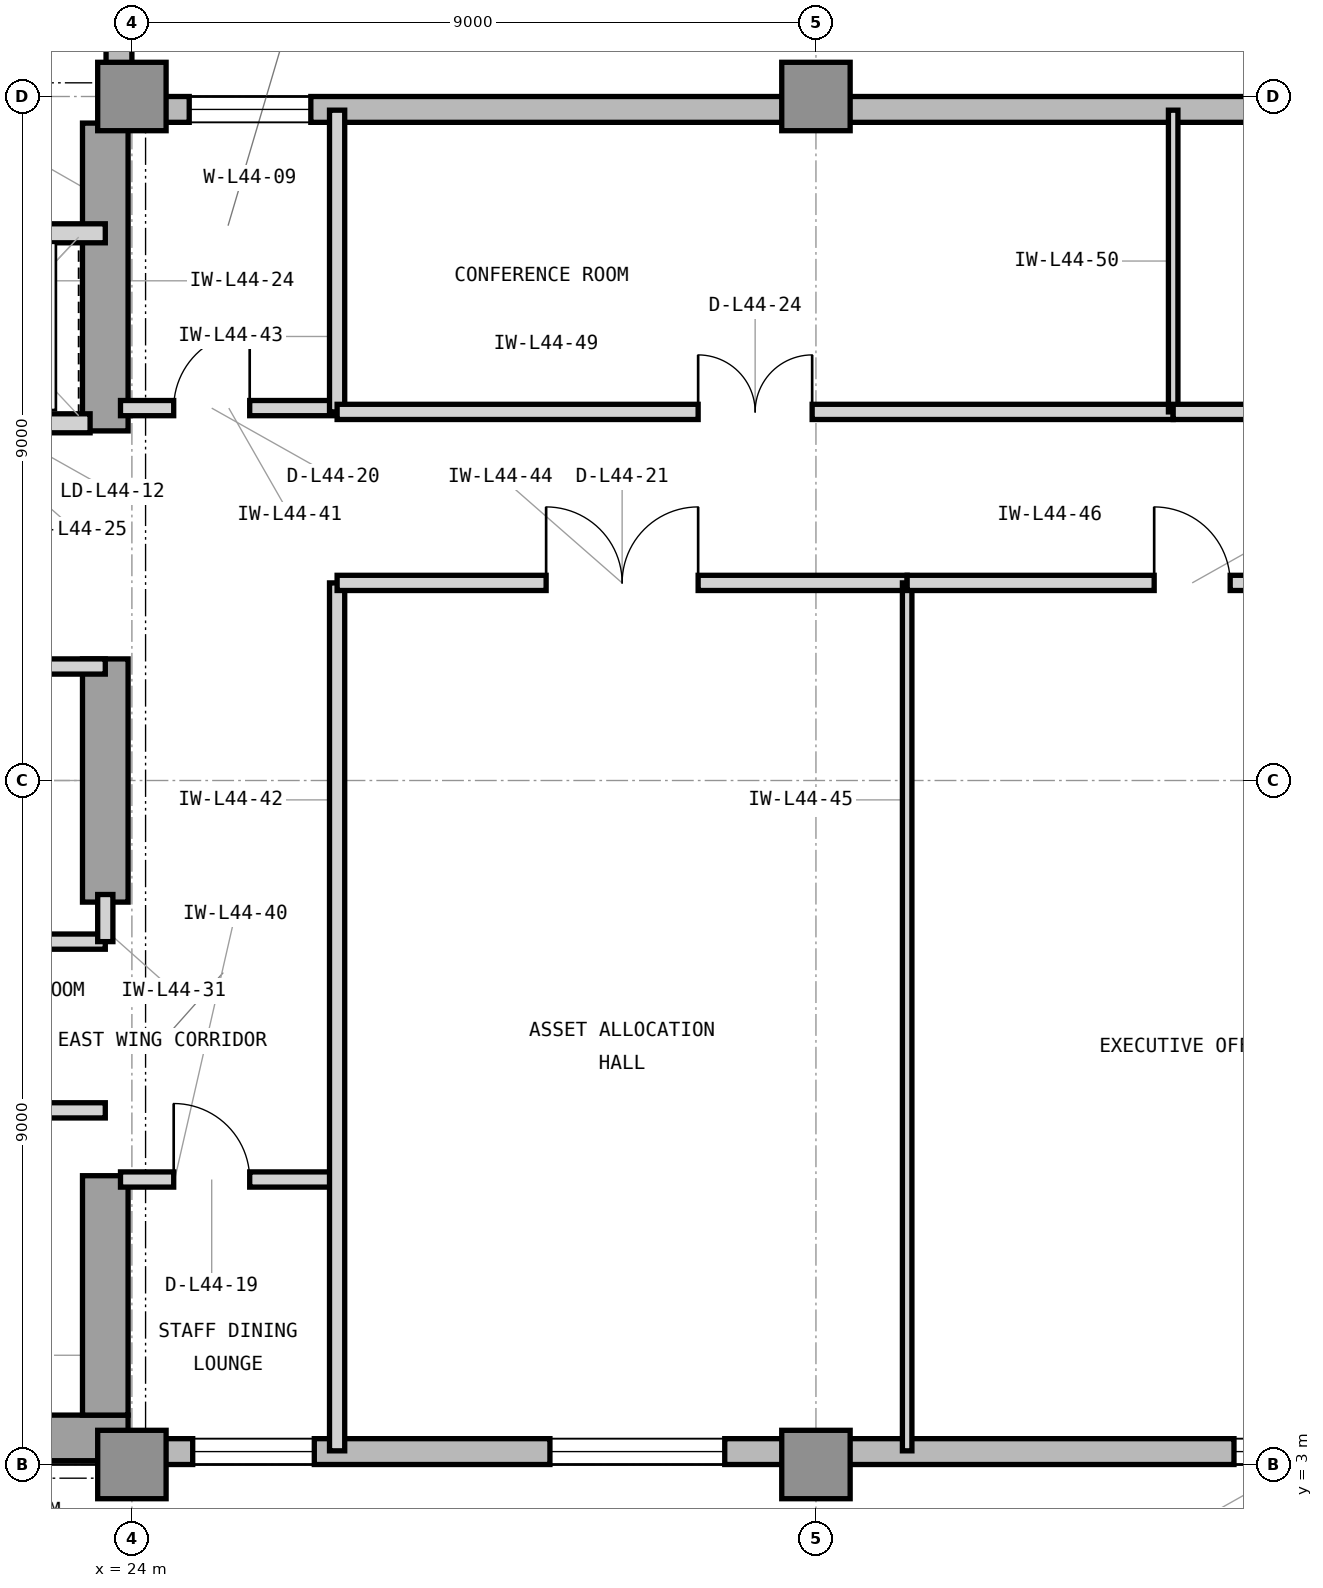
"""IFC4 building model, lengths in metres.
Left out: names, types, materials, properties, quantities, classifications, styles, units other than length and angle.
Written with IfcOpenShell. Run it as: python <this file> out.ifc"""

import sys

from ifc_helpers import new_model, si_unit, direction, frame, frame_2d, origin, origin_2d, place, context, subcontext, project, spatial, rectangle, extrude, element, fill, save


model = new_model("IFC4")
c1 = context("Model", 3, precision=1e-05, world=origin(), true_north=direction((0.0, 1.0)))
c2 = subcontext(c1, "Body", "Model", "MODEL_VIEW")
j1 = project(units=[si_unit("LENGTHUNIT", "METRE"), si_unit("PLANEANGLEUNIT", "RADIAN")], contexts=[c1])
p1 = place(None, origin())
s1 = spatial("IfcSite", under=j1, at=p1, CompositionType="ELEMENT")
p2 = place(p1, origin())
s2 = spatial("IfcBuilding", under=s1, at=p2, CompositionType="ELEMENT")
p3 = place(p2, frame((0.0, 0.0, 183.9)))
s3 = spatial("IfcBuildingStorey", under=s2, at=p3, CompositionType="ELEMENT", Elevation=183.9)
p4 = place(p3, frame((7.475, 3.35, 0.0), z_axis=(0.0, 0.0, 1.0), x_axis=(1.0, 0.0, 0.0)))
e1 = element("IfcWall", 1, at=p4, inside=s3, PredefinedType="SHEAR", context=c2, shape_type="SweptSolid", body=[
    extrude(rectangle(XDim=16.475, YDim=0.6, at=frame_2d((8.237, 0.0))), origin(), (0.0, 0.0, 1.0), 3.9),
])
p5 = place(p3, frame((23.65, 3.65, 0.0), z_axis=(0.0, 0.0, 1.0), x_axis=(0.0, 1.0, 0.0)))
e2 = element("IfcWall", 2, at=p5, inside=s3, PredefinedType="SHEAR", context=c2, shape_type="SweptSolid", body=[
    extrude(rectangle(XDim=3.15, YDim=0.6, at=frame_2d((1.575, 0.0))), origin(), (0.0, 0.0, 1.0), 3.9),
])
p6 = place(p3, frame((23.65, 10.4, 0.0), z_axis=(0.0, 0.0, 1.0), x_axis=(0.0, 1.0, 0.0)))
e3 = element("IfcWall", 3, at=p6, inside=s3, PredefinedType="SHEAR", context=c2, shape_type="SweptSolid", body=[
    extrude(rectangle(XDim=3.2, YDim=0.6, at=frame_2d((1.6, 0.0))), origin(), (0.0, 0.0, 1.0), 3.9),
])
p7 = place(p3, frame((23.65, 16.6, 0.0), z_axis=(0.0, 0.0, 1.0), x_axis=(0.0, 1.0, 0.0)))
e4 = element("IfcWall", 4, at=p7, inside=s3, PredefinedType="SHEAR", context=c2, shape_type="SweptSolid", body=[
    extrude(rectangle(XDim=4.05, YDim=0.6, at=frame_2d((2.025, 0.0))), origin(), (0.0, 0.0, 1.0), 3.9),
])
for number, where, z_axis, x_axis in (
    (5, (24.0, 3.0, 0.0), (0.0, 0.0, 1.0), (1.0, 0.0, 0.0)),
    (6, (24.0, 21.0, 0.0), (0.0, 0.0, 1.0), (1.0, 0.0, 0.0)),
    (7, (33.0, 3.0, 0.0), (0.0, 0.0, 1.0), (1.0, 0.0, 0.0)),
    (8, (33.0, 21.0, 0.0), (0.0, 0.0, 1.0), (1.0, 0.0, 0.0)),
):
    element("IfcColumn", number, at=place(p3, frame(where, z_axis=z_axis, x_axis=x_axis)), inside=s3, PredefinedType="COLUMN", context=c2, shape_type="SweptSolid", body=[
        extrude(rectangle(XDim=0.9, YDim=0.9, at=origin_2d()), origin(), (0.0, 0.0, 1.0), 3.9),
    ])
p8 = place(p3, frame((23.9, 3.17, 0.0), z_axis=(0.0, 0.0, 1.0), x_axis=(1.0, 0.0, 0.0)))
e9 = element("IfcWall", 9, at=p8, inside=s3, PredefinedType="STANDARD", context=c2, shape_type="SweptSolid", body=[
    extrude(rectangle(XDim=31.5, YDim=0.34, at=frame_2d((15.75, 0.0))), origin(), (0.0, 0.0, 1.0), 3.7),
])
p9 = place(p8, frame((5.6, 0.0, 0.9)))
e10 = element("IfcOpeningElement", 10, at=p9, cuts=e9, PredefinedType="OPENING", context=c2, shape_type="SweptSolid", body=[
    extrude(rectangle(XDim=2.3, YDim=2.2, at=frame_2d((1.15, 1.1))), frame((0.0, 0.18, 0.0), z_axis=(0.0, -1.0, 0.0), x_axis=(1.0, 0.0, 0.0)), (0.0, 0.0, 1.0), 0.36),
])
p10 = place(p8, frame((14.6, 0.0, 0.9)))
e11 = element("IfcOpeningElement", 11, at=p10, cuts=e9, PredefinedType="OPENING", context=c2, shape_type="SweptSolid", body=[
    extrude(rectangle(XDim=2.3, YDim=2.2, at=frame_2d((1.15, 1.1))), frame((0.0, 0.18, 0.0), z_axis=(0.0, -1.0, 0.0), x_axis=(1.0, 0.0, 0.0)), (0.0, 0.0, 1.0), 0.36),
])
p11 = place(p8, frame((19.1, 0.0, 0.9)))
e12 = element("IfcOpeningElement", 12, at=p11, cuts=e9, PredefinedType="OPENING", context=c2, shape_type="SweptSolid", body=[
    extrude(rectangle(XDim=2.3, YDim=2.2, at=frame_2d((1.15, 1.1))), frame((0.0, 0.18, 0.0), z_axis=(0.0, -1.0, 0.0), x_axis=(1.0, 0.0, 0.0)), (0.0, 0.0, 1.0), 0.36),
])
p12 = place(p8, frame((0.9, 0.0, 0.9)))
e13 = element("IfcOpeningElement", 13, at=p12, cuts=e9, PredefinedType="OPENING", context=c2, shape_type="SweptSolid", body=[
    extrude(rectangle(XDim=1.6, YDim=2.2, at=frame_2d((0.8, 1.1))), frame((0.0, 0.18, 0.0), z_axis=(0.0, -1.0, 0.0), x_axis=(1.0, 0.0, 0.0)), (0.0, 0.0, 1.0), 0.36),
])
p13 = place(p3, frame((55.4, 20.83, 0.0), z_axis=(0.0, 0.0, 1.0), x_axis=(-1.0, 0.0, 0.0)))
e14 = element("IfcWall", 14, at=p13, inside=s3, PredefinedType="STANDARD", context=c2, shape_type="SweptSolid", body=[
    extrude(rectangle(XDim=31.4, YDim=0.34, at=frame_2d((15.7, 0.0))), origin(), (0.0, 0.0, 1.0), 3.7),
])
p14 = place(p13, frame((29.046, 0.0, 0.9)))
e15 = element("IfcOpeningElement", 15, at=p14, cuts=e14, PredefinedType="OPENING", context=c2, shape_type="SweptSolid", body=[
    extrude(rectangle(XDim=1.6, YDim=2.2, at=frame_2d((0.8, 1.1))), frame((0.0, 0.18, 0.0), z_axis=(0.0, -1.0, 0.0), x_axis=(1.0, 0.0, 0.0)), (0.0, 0.0, 1.0), 0.36),
])
p15 = place(p13, frame((10.125, 0.0, 0.9)))
e16 = element("IfcOpeningElement", 16, at=p15, cuts=e14, PredefinedType="OPENING", context=c2, shape_type="SweptSolid", body=[
    extrude(rectangle(XDim=2.3, YDim=2.2, at=frame_2d((1.15, 1.1))), frame((0.0, 0.18, 0.0), z_axis=(0.0, -1.0, 0.0), x_axis=(1.0, 0.0, 0.0)), (0.0, 0.0, 1.0), 0.36),
])
p16 = place(p3, frame((23.83, 21.0, 0.0), z_axis=(0.0, 0.0, 1.0), x_axis=(0.0, 1.0, 0.0)))
e17 = element("IfcWall", 17, at=p16, inside=s3, PredefinedType="STANDARD", context=c2, shape_type="SweptSolid", body=[
    extrude(rectangle(XDim=22.4, YDim=0.34, at=frame_2d((11.2, 0.0))), origin(), (0.0, 0.0, 1.0), 3.7),
])
p17 = place(p16, frame((10.955, 0.0, 0.9)))
e18 = element("IfcOpeningElement", 18, at=p17, cuts=e17, PredefinedType="OPENING", context=c2, shape_type="SweptSolid", body=[
    extrude(rectangle(XDim=2.3, YDim=2.2, at=frame_2d((1.15, 1.1))), frame((0.0, 0.18, 0.0), z_axis=(0.0, -1.0, 0.0), x_axis=(1.0, 0.0, 0.0)), (0.0, 0.0, 1.0), 0.36),
])
p18 = place(p3, frame((21.05, 16.7, 0.0), z_axis=(0.0, 0.0, 1.0), x_axis=(1.0, 0.0, 0.0)))
e19 = element("IfcWall", 19, at=p18, inside=s3, PredefinedType="PARTITIONING", context=c2, shape_type="SweptSolid", body=[
    extrude(rectangle(XDim=2.4, YDim=0.25, at=frame_2d((1.2, 0.0))), origin(), (0.0, 0.0, 1.0), 3.283),
])
p19 = place(p18, frame((0.52, 0.0, 0.0)))
e20 = element("IfcOpeningElement", 20, at=p19, cuts=e19, PredefinedType="OPENING", context=c2, shape_type="SweptSolid", body=[
    extrude(rectangle(XDim=1.15, YDim=2.25, at=frame_2d((0.575, 1.125))), frame((0.0, 0.135, 0.0), z_axis=(0.0, -1.0, 0.0), x_axis=(1.0, 0.0, 0.0)), (0.0, 0.0, 1.0), 0.27),
])
p20 = place(p3, frame((16.45, 19.2, 0.0), z_axis=(0.0, 0.0, 1.0), x_axis=(1.0, 0.0, 0.0)))
e21 = element("IfcWall", 21, at=p20, inside=s3, PredefinedType="PARTITIONING", context=c2, shape_type="SweptSolid", body=[
    extrude(rectangle(XDim=7.2, YDim=0.25, at=frame_2d((3.6, 0.0))), origin(), (0.0, 0.0, 1.0), 3.69),
])
p21 = place(p3, frame((20.85, 7.66, 0.0), z_axis=(0.0, 0.0, 1.0), x_axis=(1.0, 0.0, 0.0)))
e22 = element("IfcWall", 22, at=p21, inside=s3, PredefinedType="PARTITIONING", context=c2, shape_type="SweptSolid", body=[
    extrude(rectangle(XDim=2.8, YDim=0.2, at=frame_2d((1.4, 0.0))), origin(), (0.0, 0.0, 1.0), 3.69),
])
p22 = place(p21, frame((0.95, 0.0, 0.0)))
e23 = element("IfcOpeningElement", 23, at=p22, cuts=e22, PredefinedType="OPENING", context=c2, shape_type="SweptSolid", body=[
    extrude(rectangle(XDim=0.9, YDim=2.1, at=frame_2d((0.45, 1.05))), frame((0.0, 0.11, 0.0), z_axis=(0.0, -1.0, 0.0), x_axis=(1.0, 0.0, 0.0)), (0.0, 0.0, 1.0), 0.22),
])
p23 = place(p3, frame((14.825, 9.88, 0.0), z_axis=(0.0, 0.0, 1.0), x_axis=(1.0, 0.0, 0.0)))
e24 = element("IfcWall", 24, at=p23, inside=s3, PredefinedType="PARTITIONING", context=c2, shape_type="SweptSolid", body=[
    extrude(rectangle(XDim=8.825, YDim=0.2, at=frame_2d((4.413, 0.0))), origin(), (0.0, 0.0, 1.0), 3.69),
])
p24 = place(p3, frame((23.65, 9.88, 0.0), z_axis=(0.0, 0.0, 1.0), x_axis=(0.0, 1.0, 0.0)))
e25 = element("IfcWall", 25, at=p24, inside=s3, PredefinedType="PARTITIONING", context=c2, shape_type="SweptSolid", body=[
    extrude(rectangle(XDim=0.62, YDim=0.2, at=frame_2d((0.31, 0.0))), origin(), (0.0, 0.0, 1.0), 3.69),
])
p25 = place(p3, frame((19.9, 13.5, 0.0), z_axis=(0.0, 0.0, 1.0), x_axis=(1.0, 0.0, 0.0)))
e26 = element("IfcWall", 26, at=p25, inside=s3, PredefinedType="PARTITIONING", context=c2, shape_type="SweptSolid", body=[
    extrude(rectangle(XDim=3.75, YDim=0.2, at=frame_2d((1.875, 0.0))), origin(), (0.0, 0.0, 1.0), 3.283),
])
p26 = place(p25, frame((1.4, 0.0, 0.0)))
e27 = element("IfcOpeningElement", 27, at=p26, cuts=e26, PredefinedType="OPENING", context=c2, shape_type="SweptSolid", body=[
    extrude(rectangle(XDim=0.95, YDim=2.1, at=frame_2d((0.475, 1.05))), frame((0.0, 0.11, 0.0), z_axis=(0.0, -1.0, 0.0), x_axis=(1.0, 0.0, 0.0)), (0.0, 0.0, 1.0), 0.22),
])
p27 = place(p3, frame((23.85, 6.75, 0.0), z_axis=(0.0, 0.0, 1.0), x_axis=(1.0, 0.0, 0.0)))
e28 = element("IfcWall", 28, at=p27, inside=s3, PredefinedType="PARTITIONING", context=c2, shape_type="SweptSolid", body=[
    extrude(rectangle(XDim=2.85, YDim=0.2, at=frame_2d((1.425, 0.0))), origin(), (0.0, 0.0, 1.0), 3.69),
])
p28 = place(p27, frame((0.7, 0.0, 0.0)))
e29 = element("IfcOpeningElement", 29, at=p28, cuts=e28, PredefinedType="OPENING", context=c2, shape_type="SweptSolid", body=[
    extrude(rectangle(XDim=1.0, YDim=2.15, at=frame_2d((0.5, 1.075))), frame((0.0, 0.11, 0.0), z_axis=(0.0, -1.0, 0.0), x_axis=(1.0, 0.0, 0.0)), (0.0, 0.0, 1.0), 0.22),
])
p29 = place(p3, frame((23.85, 16.9, 0.0), z_axis=(0.0, 0.0, 1.0), x_axis=(1.0, 0.0, 0.0)))
e30 = element("IfcWall", 30, at=p29, inside=s3, PredefinedType="PARTITIONING", context=c2, shape_type="SweptSolid", body=[
    extrude(rectangle(XDim=2.85, YDim=0.2, at=frame_2d((1.425, 0.0))), origin(), (0.0, 0.0, 1.0), 3.69),
])
p30 = place(p29, frame((0.7, 0.0, 0.0)))
e31 = element("IfcOpeningElement", 31, at=p30, cuts=e30, PredefinedType="OPENING", context=c2, shape_type="SweptSolid", body=[
    extrude(rectangle(XDim=1.0, YDim=2.15, at=frame_2d((0.5, 1.075))), frame((0.0, 0.11, 0.0), z_axis=(0.0, -1.0, 0.0), x_axis=(1.0, 0.0, 0.0)), (0.0, 0.0, 1.0), 0.22),
])
p31 = place(p3, frame((26.7, 3.18, 0.0), z_axis=(0.0, 0.0, 1.0), x_axis=(0.0, 1.0, 0.0)))
e32 = element("IfcWall", 32, at=p31, inside=s3, PredefinedType="PARTITIONING", context=c2, shape_type="SweptSolid", body=[
    extrude(rectangle(XDim=11.42, YDim=0.2, at=frame_2d((5.71, 0.0))), origin(), (0.0, 0.0, 1.0), 3.69),
])
p32 = place(p3, frame((26.7, 16.85, 0.0), z_axis=(0.0, 0.0, 1.0), x_axis=(0.0, 1.0, 0.0)))
e33 = element("IfcWall", 33, at=p32, inside=s3, PredefinedType="PARTITIONING", context=c2, shape_type="SweptSolid", body=[
    extrude(rectangle(XDim=3.97, YDim=0.2, at=frame_2d((1.985, 0.0))), origin(), (0.0, 0.0, 1.0), 3.69),
])
p33 = place(p3, frame((26.7, 14.6, 0.0), z_axis=(0.0, 0.0, 1.0), x_axis=(1.0, 0.0, 0.0)))
e34 = element("IfcWall", 34, at=p33, inside=s3, PredefinedType="PARTITIONING", context=c2, shape_type="SweptSolid", body=[
    extrude(rectangle(XDim=7.5, YDim=0.2, at=frame_2d((3.75, 0.0))), origin(), (0.0, 0.0, 1.0), 3.69),
])
p34 = place(p33, frame((2.75, 0.0, 0.0)))
e35 = element("IfcOpeningElement", 35, at=p34, cuts=e34, PredefinedType="OPENING", context=c2, shape_type="SweptSolid", body=[
    extrude(rectangle(XDim=2.0, YDim=2.5, at=frame_2d((1.0, 1.25))), frame((0.0, 0.11, 0.0), z_axis=(0.0, -1.0, 0.0), x_axis=(1.0, 0.0, 0.0)), (0.0, 0.0, 1.0), 0.22),
])
p35 = place(p3, frame((34.2, 3.18, 0.0), z_axis=(0.0, 0.0, 1.0), x_axis=(0.0, 1.0, 0.0)))
e36 = element("IfcWall", 36, at=p35, inside=s3, PredefinedType="PARTITIONING", context=c2, shape_type="SweptSolid", body=[
    extrude(rectangle(XDim=11.42, YDim=0.125, at=frame_2d((5.71, 0.0))), origin(), (0.0, 0.0, 1.0), 3.69),
])
p36 = place(p3, frame((34.2, 14.6, 0.0), z_axis=(0.0, 0.0, 1.0), x_axis=(1.0, 0.0, 0.0)))
e37 = element("IfcWall", 37, at=p36, inside=s3, PredefinedType="PARTITIONING", context=c2, shape_type="SweptSolid", body=[
    extrude(rectangle(XDim=7.5, YDim=0.2, at=frame_2d((3.75, 0.0))), origin(), (0.0, 0.0, 1.0), 3.69),
])
p37 = place(p36, frame((3.25, 0.0, 0.0)))
e38 = element("IfcOpeningElement", 38, at=p37, cuts=e37, PredefinedType="OPENING", context=c2, shape_type="SweptSolid", body=[
    extrude(rectangle(XDim=1.0, YDim=2.15, at=frame_2d((0.5, 1.075))), frame((0.0, 0.11, 0.0), z_axis=(0.0, -1.0, 0.0), x_axis=(1.0, 0.0, 0.0)), (0.0, 0.0, 1.0), 0.22),
])
p38 = place(p3, frame((26.7, 16.85, 0.0), z_axis=(0.0, 0.0, 1.0), x_axis=(1.0, 0.0, 0.0)))
e39 = element("IfcWall", 39, at=p38, inside=s3, PredefinedType="PARTITIONING", context=c2, shape_type="SweptSolid", body=[
    extrude(rectangle(XDim=11.0, YDim=0.2, at=frame_2d((5.5, 0.0))), origin(), (0.0, 0.0, 1.0), 3.69),
])
p39 = place(p38, frame((4.75, 0.0, 0.0)))
e40 = element("IfcOpeningElement", 40, at=p39, cuts=e39, PredefinedType="OPENING", context=c2, shape_type="SweptSolid", body=[
    extrude(rectangle(XDim=1.5, YDim=2.3, at=frame_2d((0.75, 1.15))), frame((0.0, 0.11, 0.0), z_axis=(0.0, -1.0, 0.0), x_axis=(1.0, 0.0, 0.0)), (0.0, 0.0, 1.0), 0.22),
])
p40 = place(p3, frame((37.7, 16.85, 0.0), z_axis=(0.0, 0.0, 1.0), x_axis=(0.0, 1.0, 0.0)))
e41 = element("IfcWall", 41, at=p40, inside=s3, PredefinedType="PARTITIONING", context=c2, shape_type="SweptSolid", body=[
    extrude(rectangle(XDim=3.97, YDim=0.125, at=frame_2d((1.985, 0.0))), origin(), (0.0, 0.0, 1.0), 3.69),
])
p41 = place(p3, frame((37.7, 16.85, 0.0), z_axis=(0.0, 0.0, 1.0), x_axis=(1.0, 0.0, 0.0)))
e42 = element("IfcWall", 42, at=p41, inside=s3, PredefinedType="PARTITIONING", context=c2, shape_type="SweptSolid", body=[
    extrude(rectangle(XDim=10.3, YDim=0.2, at=frame_2d((5.15, 0.0))), origin(), (0.0, 0.0, 1.0), 3.69),
])
p42 = place(p41, frame((4.65, 0.0, 0.0)))
e43 = element("IfcOpeningElement", 43, at=p42, cuts=e42, PredefinedType="OPENING", context=c2, shape_type="SweptSolid", body=[
    extrude(rectangle(XDim=1.0, YDim=2.15, at=frame_2d((0.5, 1.075))), frame((0.0, 0.11, 0.0), z_axis=(0.0, -1.0, 0.0), x_axis=(1.0, 0.0, 0.0)), (0.0, 0.0, 1.0), 0.22),
])
p43 = place(p9, origin())
e44 = element("IfcWindow", 44, at=p43, inside=s3, PartitioningType="SINGLE_PANEL", PredefinedType="WINDOW", context=c2, shape_type="SweptSolid", body=[
    extrude(rectangle(XDim=2.3, YDim=2.2, at=frame_2d((1.15, 1.1))), frame((0.0, 0.11, 0.0), z_axis=(0.0, -1.0, 0.0), x_axis=(1.0, 0.0, 0.0)), (0.0, 0.0, 1.0), 0.06),
])
fill(e10, e44)
p44 = place(p10, origin())
e45 = element("IfcWindow", 45, at=p44, inside=s3, PartitioningType="SINGLE_PANEL", PredefinedType="WINDOW", context=c2, shape_type="SweptSolid", body=[
    extrude(rectangle(XDim=2.3, YDim=2.2, at=frame_2d((1.15, 1.1))), frame((0.0, 0.11, 0.0), z_axis=(0.0, -1.0, 0.0), x_axis=(1.0, 0.0, 0.0)), (0.0, 0.0, 1.0), 0.06),
])
fill(e11, e45)
p45 = place(p28, origin())
e46 = element("IfcDoor", 46, at=p45, inside=s3, OperationType="SINGLE_SWING_LEFT", PredefinedType="DOOR", context=c2, shape_type="SweptSolid", body=[
    extrude(rectangle(XDim=1.0, YDim=2.15, at=frame_2d((0.5, 1.075))), frame((0.0, 0.025, 0.0), z_axis=(0.0, -1.0, 0.0), x_axis=(1.0, 0.0, 0.0)), (0.0, 0.0, 1.0), 0.05),
])
fill(e29, e46)
p46 = place(p30, origin())
e47 = element("IfcDoor", 47, at=p46, inside=s3, OperationType="SINGLE_SWING_RIGHT", PredefinedType="DOOR", context=c2, shape_type="SweptSolid", body=[
    extrude(rectangle(XDim=1.0, YDim=2.15, at=frame_2d((0.5, 1.075))), frame((0.0, 0.025, 0.0), z_axis=(0.0, -1.0, 0.0), x_axis=(1.0, 0.0, 0.0)), (0.0, 0.0, 1.0), 0.05),
])
fill(e31, e47)
p47 = place(p34, origin())
e48 = element("IfcDoor", 48, at=p47, inside=s3, OperationType="DOUBLE_DOOR_SINGLE_SWING", PredefinedType="DOOR", context=c2, shape_type="SweptSolid", body=[
    extrude(rectangle(XDim=2.0, YDim=2.5, at=frame_2d((1.0, 1.25))), frame((0.0, 0.025, 0.0), z_axis=(0.0, -1.0, 0.0), x_axis=(1.0, 0.0, 0.0)), (0.0, 0.0, 1.0), 0.05),
])
fill(e35, e48)
p48 = place(p37, origin())
e49 = element("IfcDoor", 49, at=p48, inside=s3, OperationType="SINGLE_SWING_LEFT", PredefinedType="DOOR", context=c2, shape_type="SweptSolid", body=[
    extrude(rectangle(XDim=1.0, YDim=2.15, at=frame_2d((0.5, 1.075))), frame((0.0, 0.025, 0.0), z_axis=(0.0, -1.0, 0.0), x_axis=(1.0, 0.0, 0.0)), (0.0, 0.0, 1.0), 0.05),
])
fill(e38, e49)
p49 = place(p39, origin())
e50 = element("IfcDoor", 50, at=p49, inside=s3, OperationType="DOUBLE_DOOR_SINGLE_SWING", PredefinedType="DOOR", context=c2, shape_type="SweptSolid", body=[
    extrude(rectangle(XDim=1.5, YDim=2.3, at=frame_2d((0.75, 1.15))), frame((0.0, 0.025, 0.0), z_axis=(0.0, -1.0, 0.0), x_axis=(1.0, 0.0, 0.0)), (0.0, 0.0, 1.0), 0.05),
])
fill(e40, e50)
p50 = place(p12, origin())
e51 = element("IfcWindow", 51, at=p50, inside=s3, PartitioningType="SINGLE_PANEL", PredefinedType="WINDOW", context=c2, shape_type="SweptSolid", body=[
    extrude(rectangle(XDim=1.6, YDim=2.2, at=frame_2d((0.8, 1.1))), frame((0.0, 0.11, 0.0), z_axis=(0.0, -1.0, 0.0), x_axis=(1.0, 0.0, 0.0)), (0.0, 0.0, 1.0), 0.06),
])
fill(e13, e51)
p51 = place(p14, origin())
e52 = element("IfcWindow", 52, at=p51, inside=s3, PartitioningType="SINGLE_PANEL", PredefinedType="WINDOW", context=c2, shape_type="SweptSolid", body=[
    extrude(rectangle(XDim=1.6, YDim=2.2, at=frame_2d((0.8, 1.1))), frame((0.0, 0.11, 0.0), z_axis=(0.0, -1.0, 0.0), x_axis=(1.0, 0.0, 0.0)), (0.0, 0.0, 1.0), 0.06),
])
fill(e15, e52)
save(model, sys.argv[1])
